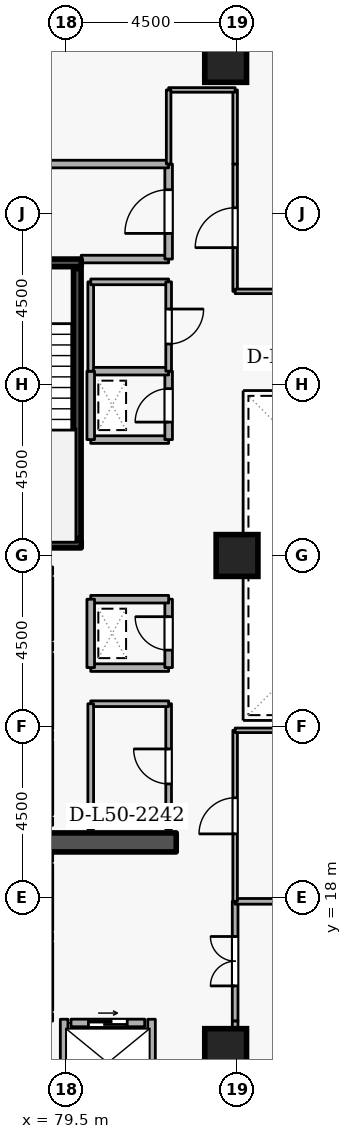
"""IFC4 building model, lengths in metres.
Left out: names, types, materials, properties, quantities, classifications, styles, units other than length and angle.
Written with IfcOpenShell. Run it as: python <this file> out.ifc"""

import sys

from ifc_helpers import new_model, si_unit, direction, frame, frame_2d, origin, origin_2d, place, context, subcontext, project, spatial, rectangle, extrude, element, fill, save


model = new_model("IFC4")
c1 = context("Model", 3, precision=1e-05, world=origin(), true_north=direction((0.0, 1.0)))
c2 = subcontext(c1, "Body", "Model", "MODEL_VIEW")
j1 = project(units=[si_unit("LENGTHUNIT", "METRE"), si_unit("PLANEANGLEUNIT", "RADIAN")], contexts=[c1])
p1 = place(None, origin())
s1 = spatial("IfcSite", under=j1, at=p1, CompositionType="ELEMENT")
p2 = place(p1, origin())
s2 = spatial("IfcBuilding", under=s1, at=p2, CompositionType="ELEMENT")
p3 = place(p2, frame((0.0, 0.0, 189.3)))
s3 = spatial("IfcBuildingStorey", under=s2, at=p3, CompositionType="ELEMENT", Elevation=189.3)
p4 = place(p3, frame((76.6, 19.45, 0.0), z_axis=(0.0, 0.0, 1.0), x_axis=(1.0, 0.0, 0.0)))
e1 = element("IfcWall", 1, at=p4, inside=s3, PredefinedType="SHEAR", context=c2, shape_type="SweptSolid", body=[
    extrude(rectangle(XDim=5.8, YDim=0.5, at=frame_2d((2.9, 0.0))), origin(), (0.0, 0.0, 1.0), 3.6),
])
for number, where, z_axis, x_axis in (
    (2, (83.7, 14.0, 0.0), (0.0, 0.0, 1.0), (1.0, 0.0, 0.0)),
    (3, (83.7, 40.0, 0.0), (0.0, 0.0, 1.0), (1.0, 0.0, 0.0)),
    (4, (84.0, 27.0, 0.0), (0.0, 0.0, 1.0), (1.0, 0.0, 0.0)),
):
    element("IfcColumn", number, at=place(p3, frame(where, z_axis=z_axis, x_axis=x_axis)), inside=s3, PredefinedType="COLUMN", context=c2, shape_type="SweptSolid", body=[
        extrude(rectangle(XDim=1.1, YDim=1.1, at=origin_2d()), origin(), (0.0, 0.0, 1.0), 3.6),
    ])
p5 = place(p3, frame((79.05, 24.78, 0.0), z_axis=(0.0, 0.0, 1.0), x_axis=(0.0, 1.0, 0.0)))
e5 = element("IfcWall", 5, at=p5, inside=s3, PredefinedType="STANDARD", context=c2, shape_type="SweptSolid", body=[
    extrude(rectangle(XDim=1.64, YDim=0.2, at=frame_2d((0.82, 0.0))), origin(), (0.0, 0.0, 1.0), 3.34),
])
p6 = place(p5, frame((0.31, 0.0, 0.0)))
e6 = element("IfcOpeningElement", 6, at=p6, cuts=e5, PredefinedType="OPENING", context=c2, shape_type="SweptSolid", body=[
    extrude(rectangle(XDim=1.02, YDim=2.06, at=frame_2d((0.51, 1.03))), frame((0.0, 0.11, 0.0), z_axis=(0.0, -1.0, 0.0), x_axis=(1.0, 0.0, 0.0)), (0.0, 0.0, 1.0), 0.22),
])
p7 = place(p3, frame((79.05, 22.43, 0.0), z_axis=(0.0, 0.0, 1.0), x_axis=(0.0, 1.0, 0.0)))
e7 = element("IfcWall", 7, at=p7, inside=s3, PredefinedType="STANDARD", context=c2, shape_type="SweptSolid", body=[
    extrude(rectangle(XDim=1.99, YDim=0.2, at=frame_2d((0.995, 0.0))), origin(), (0.0, 0.0, 1.0), 3.34),
])
p8 = place(p7, frame((0.485, 0.0, 0.0)))
e8 = element("IfcOpeningElement", 8, at=p8, cuts=e7, PredefinedType="OPENING", context=c2, shape_type="SweptSolid", body=[
    extrude(rectangle(XDim=1.02, YDim=2.06, at=frame_2d((0.51, 1.03))), frame((0.0, 0.11, 0.0), z_axis=(0.0, -1.0, 0.0), x_axis=(1.0, 0.0, 0.0)), (0.0, 0.0, 1.0), 0.22),
])
p9 = place(p3, frame((79.05, 20.18, 0.0), z_axis=(0.0, 0.0, 1.0), x_axis=(0.0, 1.0, 0.0)))
e9 = element("IfcWall", 9, at=p9, inside=s3, PredefinedType="STANDARD", context=c2, shape_type="SweptSolid", body=[
    extrude(rectangle(XDim=1.94, YDim=0.2, at=frame_2d((0.97, 0.0))), origin(), (0.0, 0.0, 1.0), 3.34),
])
p10 = place(p9, frame((0.46, 0.0, 0.0)))
e10 = element("IfcOpeningElement", 10, at=p10, cuts=e9, PredefinedType="OPENING", context=c2, shape_type="SweptSolid", body=[
    extrude(rectangle(XDim=1.02, YDim=2.06, at=frame_2d((0.51, 1.03))), frame((0.0, 0.11, 0.0), z_axis=(0.0, -1.0, 0.0), x_axis=(1.0, 0.0, 0.0)), (0.0, 0.0, 1.0), 0.22),
])
p11 = place(p3, frame((79.05, 17.13, 0.0), z_axis=(0.0, 0.0, 1.0), x_axis=(0.0, 1.0, 0.0)))
e11 = element("IfcWall", 11, at=p11, inside=s3, PredefinedType="STANDARD", context=c2, shape_type="SweptSolid", body=[
    extrude(rectangle(XDim=1.74, YDim=0.2, at=frame_2d((0.87, 0.0))), origin(), (0.0, 0.0, 1.0), 3.34),
])
p12 = place(p11, frame((0.36, 0.0, 0.0)))
e12 = element("IfcOpeningElement", 12, at=p12, cuts=e11, PredefinedType="OPENING", context=c2, shape_type="SweptSolid", body=[
    extrude(rectangle(XDim=1.02, YDim=2.06, at=frame_2d((0.51, 1.03))), frame((0.0, 0.11, 0.0), z_axis=(0.0, -1.0, 0.0), x_axis=(1.0, 0.0, 0.0)), (0.0, 0.0, 1.0), 0.22),
])
p13 = place(p3, frame((79.05, 15.03, 0.0), z_axis=(0.0, 0.0, 1.0), x_axis=(0.0, 1.0, 0.0)))
e13 = element("IfcWall", 13, at=p13, inside=s3, PredefinedType="STANDARD", context=c2, shape_type="SweptSolid", body=[
    extrude(rectangle(XDim=1.79, YDim=0.2, at=frame_2d((0.895, 0.0))), origin(), (0.0, 0.0, 1.0), 3.34),
])
p14 = place(p13, frame((0.385, 0.0, 0.0)))
e14 = element("IfcOpeningElement", 14, at=p14, cuts=e13, PredefinedType="OPENING", context=c2, shape_type="SweptSolid", body=[
    extrude(rectangle(XDim=1.02, YDim=2.06, at=frame_2d((0.51, 1.03))), frame((0.0, 0.11, 0.0), z_axis=(0.0, -1.0, 0.0), x_axis=(1.0, 0.0, 0.0)), (0.0, 0.0, 1.0), 0.22),
])
p15 = place(p3, frame((79.63, 14.7, 0.0), z_axis=(0.0, 0.0, 1.0), x_axis=(1.0, 0.0, 0.0)))
e15 = element("IfcWall", 15, at=p15, inside=s3, PredefinedType="STANDARD", context=c2, shape_type="SweptSolid", body=[
    extrude(rectangle(XDim=1.94, YDim=0.2, at=frame_2d((0.97, 0.0))), origin(), (0.0, 0.0, 1.0), 3.34),
])
p16 = place(p15, frame((0.46, 0.0, 0.0)))
e16 = element("IfcOpeningElement", 16, at=p16, cuts=e15, PredefinedType="OPENING", context=c2, shape_type="SweptSolid", body=[
    extrude(rectangle(XDim=1.02, YDim=2.06, at=frame_2d((0.51, 1.03))), frame((0.0, 0.11, 0.0), z_axis=(0.0, -1.0, 0.0), x_axis=(1.0, 0.0, 0.0)), (0.0, 0.0, 1.0), 0.22),
])
for number, where, z_axis, x_axis in (
    (17, (81.75, 12.612, 0.0), (0.0, 0.0, 1.0), (0.0, 1.0, 0.0)),
    (18, (79.45, 12.612, 0.0), (0.0, 0.0, 1.0), (0.0, 1.0, 0.0)),
):
    element("IfcWall", number, at=place(p3, frame(where, z_axis=z_axis, x_axis=x_axis)), inside=s3, PredefinedType="STANDARD", context=c2, shape_type="SweptSolid", body=[
        extrude(rectangle(XDim=2.186, YDim=0.2, at=frame_2d((1.093, 0.0))), origin(), (0.0, 0.0, 1.0), 3.34),
    ])
p17 = place(p3, frame((76.55, 34.7, 0.0), z_axis=(0.0, 0.0, 1.0), x_axis=(1.0, 0.0, 0.0)))
e19 = element("IfcWall", 19, at=p17, inside=s3, PredefinedType="SHEAR", context=c2, shape_type="SweptSolid", body=[
    extrude(rectangle(XDim=3.35, YDim=0.2, at=frame_2d((1.675, 0.0))), origin(), (0.0, 0.0, 1.0), 3.6),
])
p18 = place(p17, frame((1.125, 0.0, 0.0)))
e20 = element("IfcOpeningElement", 20, at=p18, cuts=e19, PredefinedType="OPENING", context=c2, shape_type="SweptSolid", body=[
    extrude(rectangle(XDim=1.1, YDim=2.1, at=frame_2d((0.55, 1.05))), frame((0.0, 0.11, 0.0), z_axis=(0.0, -1.0, 0.0), x_axis=(1.0, 0.0, 0.0)), (0.0, 0.0, 1.0), 0.22),
])
p19 = place(p3, frame((79.9, 27.3, 0.0), z_axis=(0.0, 0.0, 1.0), x_axis=(-1.0, 0.0, 0.0)))
e21 = element("IfcWall", 21, at=p19, inside=s3, PredefinedType="SHEAR", context=c2, shape_type="SweptSolid", body=[
    extrude(rectangle(XDim=3.35, YDim=0.2, at=frame_2d((1.675, 0.0))), origin(), (0.0, 0.0, 1.0), 3.6),
])
p20 = place(p3, frame((79.797, 27.45, 0.0), z_axis=(0.0, 0.0, 1.0), x_axis=(0.0, 1.0, 0.0)))
e22 = element("IfcWall", 22, at=p20, inside=s3, PredefinedType="SHEAR", context=c2, shape_type="SweptSolid", body=[
    extrude(rectangle(XDim=7.1, YDim=0.2, at=frame_2d((3.55, 0.0))), origin(), (0.0, 0.0, 1.0), 3.6),
])
p21 = place(p3, frame((79.9, 34.8, 0.0), z_axis=(0.0, 0.0, 1.0), x_axis=(1.0, 0.0, 0.0)))
e23 = element("IfcWall", 23, at=p21, inside=s3, PredefinedType="STANDARD", context=c2, shape_type="SweptSolid", body=[
    extrude(rectangle(XDim=2.3, YDim=0.2, at=frame_2d((1.15, 0.0))), origin(), (0.0, 0.0, 1.0), 2.545),
])
p22 = place(p3, frame((82.2, 34.8, 0.0), z_axis=(0.0, 0.0, 1.0), x_axis=(0.0, 1.0, 0.0)))
e24 = element("IfcWall", 24, at=p22, inside=s3, PredefinedType="STANDARD", context=c2, shape_type="SweptSolid", body=[
    extrude(rectangle(XDim=2.5, YDim=0.2, at=frame_2d((1.25, 0.0))), origin(), (0.0, 0.0, 1.0), 3.34),
])
p23 = place(p22, frame((0.675, 0.0, 0.0)))
e25 = element("IfcOpeningElement", 25, at=p23, cuts=e24, PredefinedType="OPENING", context=c2, shape_type="SweptSolid", body=[
    extrude(rectangle(XDim=1.15, YDim=2.1, at=frame_2d((0.575, 1.05))), frame((0.0, 0.11, 0.0), z_axis=(0.0, -1.0, 0.0), x_axis=(1.0, 0.0, 0.0)), (0.0, 0.0, 1.0), 0.22),
])
p24 = place(p3, frame((82.2, 37.3, 0.0), z_axis=(0.0, 0.0, 1.0), x_axis=(-1.0, 0.0, 0.0)))
e26 = element("IfcWall", 26, at=p24, inside=s3, PredefinedType="STANDARD", context=c2, shape_type="SweptSolid", body=[
    extrude(rectangle(XDim=5.7, YDim=0.2, at=frame_2d((2.85, 0.0))), origin(), (0.0, 0.0, 1.0), 3.34),
])
p25 = place(p3, frame((80.15, 24.05, 0.0), z_axis=(0.0, 0.0, 1.0), x_axis=(1.0, 0.0, 0.0)))
e27 = element("IfcWall", 27, at=p25, inside=s3, PredefinedType="STANDARD", context=c2, shape_type="SweptSolid", body=[
    extrude(rectangle(XDim=2.05, YDim=0.2, at=frame_2d((1.025, 0.0))), origin(), (0.0, 0.0, 1.0), 3.34),
])
p26 = place(p3, frame((82.2, 24.05, 0.0), z_axis=(0.0, 0.0, 1.0), x_axis=(0.0, 1.0, 0.0)))
e28 = element("IfcWall", 28, at=p26, inside=s3, PredefinedType="STANDARD", context=c2, shape_type="SweptSolid", body=[
    extrude(rectangle(XDim=1.8, YDim=0.2, at=frame_2d((0.9, 0.0))), origin(), (0.0, 0.0, 1.0), 3.34),
])
p27 = place(p26, frame((0.46, 0.0, 0.0)))
e29 = element("IfcOpeningElement", 29, at=p27, cuts=e28, PredefinedType="OPENING", context=c2, shape_type="SweptSolid", body=[
    extrude(rectangle(XDim=0.88, YDim=2.04, at=frame_2d((0.44, 1.02))), frame((0.0, 0.11, 0.0), z_axis=(0.0, -1.0, 0.0), x_axis=(1.0, 0.0, 0.0)), (0.0, 0.0, 1.0), 0.22),
])
p28 = place(p3, frame((82.2, 25.85, 0.0), z_axis=(0.0, 0.0, 1.0), x_axis=(-1.0, 0.0, 0.0)))
e30 = element("IfcWall", 30, at=p28, inside=s3, PredefinedType="STANDARD", context=c2, shape_type="SweptSolid", body=[
    extrude(rectangle(XDim=2.05, YDim=0.2, at=frame_2d((1.025, 0.0))), origin(), (0.0, 0.0, 1.0), 3.34),
])
p29 = place(p3, frame((80.15, 25.85, 0.0), z_axis=(0.0, 0.0, 1.0), x_axis=(0.0, -1.0, 0.0)))
e31 = element("IfcWall", 31, at=p29, inside=s3, PredefinedType="STANDARD", context=c2, shape_type="SweptSolid", body=[
    extrude(rectangle(XDim=1.8, YDim=0.2, at=frame_2d((0.9, 0.0))), origin(), (0.0, 0.0, 1.0), 3.34),
])
p30 = place(p3, frame((80.15, 30.05, 0.0), z_axis=(0.0, 0.0, 1.0), x_axis=(1.0, 0.0, 0.0)))
e32 = element("IfcWall", 32, at=p30, inside=s3, PredefinedType="STANDARD", context=c2, shape_type="SweptSolid", body=[
    extrude(rectangle(XDim=2.05, YDim=0.2, at=frame_2d((1.025, 0.0))), origin(), (0.0, 0.0, 1.0), 3.34),
])
p31 = place(p3, frame((82.2, 30.05, 0.0), z_axis=(0.0, 0.0, 1.0), x_axis=(0.0, 1.0, 0.0)))
e33 = element("IfcWall", 33, at=p31, inside=s3, PredefinedType="STANDARD", context=c2, shape_type="SweptSolid", body=[
    extrude(rectangle(XDim=1.8, YDim=0.2, at=frame_2d((0.9, 0.0))), origin(), (0.0, 0.0, 1.0), 3.34),
])
p32 = place(p31, frame((0.46, 0.0, 0.0)))
e34 = element("IfcOpeningElement", 34, at=p32, cuts=e33, PredefinedType="OPENING", context=c2, shape_type="SweptSolid", body=[
    extrude(rectangle(XDim=0.88, YDim=2.04, at=frame_2d((0.44, 1.02))), frame((0.0, 0.11, 0.0), z_axis=(0.0, -1.0, 0.0), x_axis=(1.0, 0.0, 0.0)), (0.0, 0.0, 1.0), 0.22),
])
p33 = place(p3, frame((82.2, 31.85, 0.0), z_axis=(0.0, 0.0, 1.0), x_axis=(-1.0, 0.0, 0.0)))
e35 = element("IfcWall", 35, at=p33, inside=s3, PredefinedType="STANDARD", context=c2, shape_type="SweptSolid", body=[
    extrude(rectangle(XDim=2.05, YDim=0.2, at=frame_2d((1.025, 0.0))), origin(), (0.0, 0.0, 1.0), 3.34),
])
p34 = place(p3, frame((80.15, 31.85, 0.0), z_axis=(0.0, 0.0, 1.0), x_axis=(0.0, -1.0, 0.0)))
e36 = element("IfcWall", 36, at=p34, inside=s3, PredefinedType="STANDARD", context=c2, shape_type="SweptSolid", body=[
    extrude(rectangle(XDim=1.8, YDim=0.2, at=frame_2d((0.9, 0.0))), origin(), (0.0, 0.0, 1.0), 3.34),
])
p35 = place(p3, frame((82.2, 19.8, 0.0), z_axis=(0.0, 0.0, 1.0), x_axis=(0.0, 1.0, 0.0)))
e37 = element("IfcWall", 37, at=p35, inside=s3, PredefinedType="PARTITIONING", context=c2, shape_type="SweptSolid", body=[
    extrude(rectangle(XDim=3.3, YDim=0.15, at=frame_2d((1.65, 0.0))), origin(), (0.0, 0.0, 1.0), 3.34),
])
p36 = place(p35, frame((1.19, 0.0, 0.0)))
e38 = element("IfcOpeningElement", 38, at=p36, cuts=e37, PredefinedType="OPENING", context=c2, shape_type="SweptSolid", body=[
    extrude(rectangle(XDim=0.92, YDim=2.08, at=frame_2d((0.46, 1.04))), frame((0.0, 0.085, 0.0), z_axis=(0.0, -1.0, 0.0), x_axis=(1.0, 0.0, 0.0)), (0.0, 0.0, 1.0), 0.17),
])
p37 = place(p3, frame((82.2, 23.1, 0.0), z_axis=(0.0, 0.0, 1.0), x_axis=(-1.0, 0.0, 0.0)))
e39 = element("IfcWall", 39, at=p37, inside=s3, PredefinedType="PARTITIONING", context=c2, shape_type="SweptSolid", body=[
    extrude(rectangle(XDim=2.05, YDim=0.15, at=frame_2d((1.025, 0.0))), origin(), (0.0, 0.0, 1.0), 3.34),
])
p38 = place(p3, frame((80.15, 23.1, 0.0), z_axis=(0.0, 0.0, 1.0), x_axis=(0.0, -1.0, 0.0)))
e40 = element("IfcWall", 40, at=p38, inside=s3, PredefinedType="PARTITIONING", context=c2, shape_type="SweptSolid", body=[
    extrude(rectangle(XDim=3.3, YDim=0.15, at=frame_2d((1.65, 0.0))), origin(), (0.0, 0.0, 1.0), 3.34),
])
p39 = place(p3, frame((80.15, 31.85, 0.0), z_axis=(0.0, 0.0, 1.0), x_axis=(0.0, 1.0, 0.0)))
e41 = element("IfcWall", 41, at=p39, inside=s3, PredefinedType="PARTITIONING", context=c2, shape_type="SweptSolid", body=[
    extrude(rectangle(XDim=2.35, YDim=0.15, at=frame_2d((1.175, 0.0))), origin(), (0.0, 0.0, 1.0), 3.34),
])
p40 = place(p3, frame((80.15, 34.2, 0.0), z_axis=(0.0, 0.0, 1.0), x_axis=(1.0, 0.0, 0.0)))
e42 = element("IfcWall", 42, at=p40, inside=s3, PredefinedType="PARTITIONING", context=c2, shape_type="SweptSolid", body=[
    extrude(rectangle(XDim=2.05, YDim=0.15, at=frame_2d((1.025, 0.0))), origin(), (0.0, 0.0, 1.0), 2.545),
])
p41 = place(p3, frame((82.2, 34.2, 0.0), z_axis=(0.0, 0.0, 1.0), x_axis=(0.0, -1.0, 0.0)))
e43 = element("IfcWall", 43, at=p41, inside=s3, PredefinedType="PARTITIONING", context=c2, shape_type="SweptSolid", body=[
    extrude(rectangle(XDim=2.35, YDim=0.15, at=frame_2d((1.175, 0.0))), origin(), (0.0, 0.0, 1.0), 3.34),
])
p42 = place(p41, frame((0.715, 0.0, 0.0)))
e44 = element("IfcOpeningElement", 44, at=p42, cuts=e43, PredefinedType="OPENING", context=c2, shape_type="SweptSolid", body=[
    extrude(rectangle(XDim=0.92, YDim=2.08, at=frame_2d((0.46, 1.04))), frame((0.0, 0.085, 0.0), z_axis=(0.0, -1.0, 0.0), x_axis=(1.0, 0.0, 0.0)), (0.0, 0.0, 1.0), 0.17),
])
p43 = place(p3, frame((83.95, 14.75, 0.0), z_axis=(0.0, 0.0, 1.0), x_axis=(0.0, 1.0, 0.0)))
e45 = element("IfcWall", 45, at=p43, inside=s3, PredefinedType="PARTITIONING", context=c2, shape_type="SweptSolid", body=[
    extrude(rectangle(XDim=3.15, YDim=0.15, at=frame_2d((1.575, 0.0))), origin(), (0.0, 0.0, 1.0), 3.34),
])
p44 = place(p43, frame((0.925, 0.0, 0.0)))
e46 = element("IfcOpeningElement", 46, at=p44, cuts=e45, PredefinedType="OPENING", context=c2, shape_type="SweptSolid", body=[
    extrude(rectangle(XDim=1.3, YDim=2.12, at=frame_2d((0.65, 1.06))), frame((0.0, 0.085, 0.0), z_axis=(0.0, -1.0, 0.0), x_axis=(1.0, 0.0, 0.0)), (0.0, 0.0, 1.0), 0.17),
])
p45 = place(p3, frame((83.95, 17.9, 0.0), z_axis=(0.0, 0.0, 1.0), x_axis=(1.0, 0.0, 0.0)))
e47 = element("IfcWall", 47, at=p45, inside=s3, PredefinedType="PARTITIONING", context=c2, shape_type="SweptSolid", body=[
    extrude(rectangle(XDim=4.55, YDim=0.15, at=frame_2d((2.275, 0.0))), origin(), (0.0, 0.0, 1.0), 3.34),
])
p46 = place(p3, frame((83.95, 12.4, 0.0), z_axis=(0.0, 0.0, 1.0), x_axis=(0.0, 1.0, 0.0)))
e48 = element("IfcWall", 48, at=p46, inside=s3, PredefinedType="PARTITIONING", context=c2, shape_type="SweptSolid", body=[
    extrude(rectangle(XDim=2.35, YDim=0.15, at=frame_2d((1.175, 0.0))), origin(), (0.0, 0.0, 1.0), 3.34),
])
p47 = place(p3, frame((83.95, 17.9, 0.0), z_axis=(0.0, 0.0, 1.0), x_axis=(0.0, 1.0, 0.0)))
e49 = element("IfcWall", 49, at=p47, inside=s3, PredefinedType="PARTITIONING", context=c2, shape_type="SweptSolid", body=[
    extrude(rectangle(XDim=4.5, YDim=0.12, at=frame_2d((2.25, 0.0))), origin(), (0.0, 0.0, 1.0), 3.34),
])
p48 = place(p47, frame((1.775, 0.0, 0.0)))
e50 = element("IfcOpeningElement", 50, at=p48, cuts=e49, PredefinedType="OPENING", context=c2, shape_type="SweptSolid", body=[
    extrude(rectangle(XDim=0.95, YDim=2.1, at=frame_2d((0.475, 1.05))), frame((0.0, 0.07, 0.0), z_axis=(0.0, -1.0, 0.0), x_axis=(1.0, 0.0, 0.0)), (0.0, 0.0, 1.0), 0.14),
])
p49 = place(p3, frame((83.95, 22.4, 0.0), z_axis=(0.0, 0.0, 1.0), x_axis=(1.0, 0.0, 0.0)))
e51 = element("IfcWall", 51, at=p49, inside=s3, PredefinedType="PARTITIONING", context=c2, shape_type="SweptSolid", body=[
    extrude(rectangle(XDim=9.1, YDim=0.12, at=frame_2d((4.55, 0.0))), origin(), (0.0, 0.0, 1.0), 3.34),
])
p50 = place(p3, frame((83.95, 33.95, 0.0), z_axis=(0.0, 0.0, 1.0), x_axis=(0.0, 1.0, 0.0)))
e52 = element("IfcWall", 52, at=p50, inside=s3, PredefinedType="PARTITIONING", context=c2, shape_type="SweptSolid", body=[
    extrude(rectangle(XDim=3.35, YDim=0.12, at=frame_2d((1.675, 0.0))), origin(), (0.0, 0.0, 1.0), 3.34),
])
p51 = place(p50, frame((1.15, 0.0, 0.0)))
e53 = element("IfcOpeningElement", 53, at=p51, cuts=e52, PredefinedType="OPENING", context=c2, shape_type="SweptSolid", body=[
    extrude(rectangle(XDim=1.05, YDim=2.1, at=frame_2d((0.525, 1.05))), frame((0.0, 0.07, 0.0), z_axis=(0.0, -1.0, 0.0), x_axis=(1.0, 0.0, 0.0)), (0.0, 0.0, 1.0), 0.14),
])
p52 = place(p3, frame((83.95, 37.3, 0.0), z_axis=(0.0, 0.0, 1.0), x_axis=(0.0, 1.0, 0.0)))
e54 = element("IfcWall", 54, at=p52, inside=s3, PredefinedType="PARTITIONING", context=c2, shape_type="SweptSolid", body=[
    extrude(rectangle(XDim=1.95, YDim=0.12, at=frame_2d((0.975, 0.0))), origin(), (0.0, 0.0, 1.0), 3.34),
])
p53 = place(p3, frame((83.95, 39.25, 0.0), z_axis=(0.0, 0.0, 1.0), x_axis=(-1.0, 0.0, 0.0)))
e55 = element("IfcWall", 55, at=p53, inside=s3, PredefinedType="PARTITIONING", context=c2, shape_type="SweptSolid", body=[
    extrude(rectangle(XDim=1.75, YDim=0.12, at=frame_2d((0.875, 0.0))), origin(), (0.0, 0.0, 1.0), 3.34),
])
p54 = place(p3, frame((82.2, 39.25, 0.0), z_axis=(0.0, 0.0, 1.0), x_axis=(0.0, -1.0, 0.0)))
e56 = element("IfcWall", 56, at=p54, inside=s3, PredefinedType="PARTITIONING", context=c2, shape_type="SweptSolid", body=[
    extrude(rectangle(XDim=1.95, YDim=0.12, at=frame_2d((0.975, 0.0))), origin(), (0.0, 0.0, 1.0), 3.34),
])
p55 = place(p3, frame((86.25, 33.95, 0.0), z_axis=(0.0, 0.0, 1.0), x_axis=(-1.0, 0.0, 0.0)))
e57 = element("IfcWall", 57, at=p55, inside=s3, PredefinedType="PARTITIONING", context=c2, shape_type="SweptSolid", body=[
    extrude(rectangle(XDim=2.3, YDim=0.12, at=frame_2d((1.15, 0.0))), origin(), (0.0, 0.0, 1.0), 3.34),
])
p56 = place(p16, origin())
e58 = element("IfcDoor", 58, at=p56, inside=s3, OperationType="SLIDING_TO_LEFT", PredefinedType="DOOR", context=c2, shape_type="SweptSolid", body=[
    extrude(rectangle(XDim=1.02, YDim=2.06, at=frame_2d((0.51, 1.03))), frame((0.0, 0.025, 0.0), z_axis=(0.0, -1.0, 0.0), x_axis=(1.0, 0.0, 0.0)), (0.0, 0.0, 1.0), 0.05),
])
fill(e16, e58)
p57 = place(p23, origin())
e59 = element("IfcDoor", 59, at=p57, inside=s3, OperationType="SINGLE_SWING_LEFT", PredefinedType="DOOR", context=c2, shape_type="SweptSolid", body=[
    extrude(rectangle(XDim=1.15, YDim=2.1, at=frame_2d((0.575, 1.05))), frame((0.0, 0.025, 0.0), z_axis=(0.0, -1.0, 0.0), x_axis=(1.0, 0.0, 0.0)), (0.0, 0.0, 1.0), 0.05),
])
fill(e25, e59)
p58 = place(p27, origin())
e60 = element("IfcDoor", 60, at=p58, inside=s3, OperationType="SINGLE_SWING_RIGHT", PredefinedType="DOOR", context=c2, shape_type="SweptSolid", body=[
    extrude(rectangle(XDim=0.88, YDim=2.04, at=frame_2d((0.44, 1.02))), frame((0.0, 0.025, 0.0), z_axis=(0.0, -1.0, 0.0), x_axis=(1.0, 0.0, 0.0)), (0.0, 0.0, 1.0), 0.05),
])
fill(e29, e60)
p59 = place(p32, origin())
e61 = element("IfcDoor", 61, at=p59, inside=s3, OperationType="SINGLE_SWING_LEFT", PredefinedType="DOOR", context=c2, shape_type="SweptSolid", body=[
    extrude(rectangle(XDim=0.88, YDim=2.04, at=frame_2d((0.44, 1.02))), frame((0.0, 0.025, 0.0), z_axis=(0.0, -1.0, 0.0), x_axis=(1.0, 0.0, 0.0)), (0.0, 0.0, 1.0), 0.05),
])
fill(e34, e61)
p60 = place(p36, origin())
e62 = element("IfcDoor", 62, at=p60, inside=s3, OperationType="SINGLE_SWING_RIGHT", PredefinedType="DOOR", context=c2, shape_type="SweptSolid", body=[
    extrude(rectangle(XDim=0.92, YDim=2.08, at=frame_2d((0.46, 1.04))), frame((0.0, 0.025, 0.0), z_axis=(0.0, -1.0, 0.0), x_axis=(1.0, 0.0, 0.0)), (0.0, 0.0, 1.0), 0.05),
])
fill(e38, e62)
p61 = place(p42, origin())
e63 = element("IfcDoor", 63, at=p61, inside=s3, OperationType="SINGLE_SWING_LEFT", PredefinedType="DOOR", context=c2, shape_type="SweptSolid", body=[
    extrude(rectangle(XDim=0.92, YDim=2.08, at=frame_2d((0.46, 1.04))), frame((0.0, 0.025, 0.0), z_axis=(0.0, -1.0, 0.0), x_axis=(1.0, 0.0, 0.0)), (0.0, 0.0, 1.0), 0.05),
])
fill(e44, e63)
p62 = place(p44, origin())
e64 = element("IfcDoor", 64, at=p62, inside=s3, OperationType="DOUBLE_DOOR_SINGLE_SWING", PredefinedType="DOOR", context=c2, shape_type="SweptSolid", body=[
    extrude(rectangle(XDim=1.3, YDim=2.12, at=frame_2d((0.65, 1.06))), frame((0.0, 0.025, 0.0), z_axis=(0.0, -1.0, 0.0), x_axis=(1.0, 0.0, 0.0)), (0.0, 0.0, 1.0), 0.05),
])
fill(e46, e64)
p63 = place(p48, origin())
e65 = element("IfcDoor", 65, at=p63, inside=s3, OperationType="SINGLE_SWING_LEFT", PredefinedType="DOOR", context=c2, shape_type="SweptSolid", body=[
    extrude(rectangle(XDim=0.95, YDim=2.1, at=frame_2d((0.475, 1.05))), frame((0.0, 0.025, 0.0), z_axis=(0.0, -1.0, 0.0), x_axis=(1.0, 0.0, 0.0)), (0.0, 0.0, 1.0), 0.05),
])
fill(e50, e65)
p64 = place(p51, origin())
e66 = element("IfcDoor", 66, at=p64, inside=s3, OperationType="SINGLE_SWING_LEFT", PredefinedType="DOOR", context=c2, shape_type="SweptSolid", body=[
    extrude(rectangle(XDim=1.05, YDim=2.1, at=frame_2d((0.525, 1.05))), frame((0.0, 0.025, 0.0), z_axis=(0.0, -1.0, 0.0), x_axis=(1.0, 0.0, 0.0)), (0.0, 0.0, 1.0), 0.05),
])
fill(e53, e66)
save(model, sys.argv[1])
